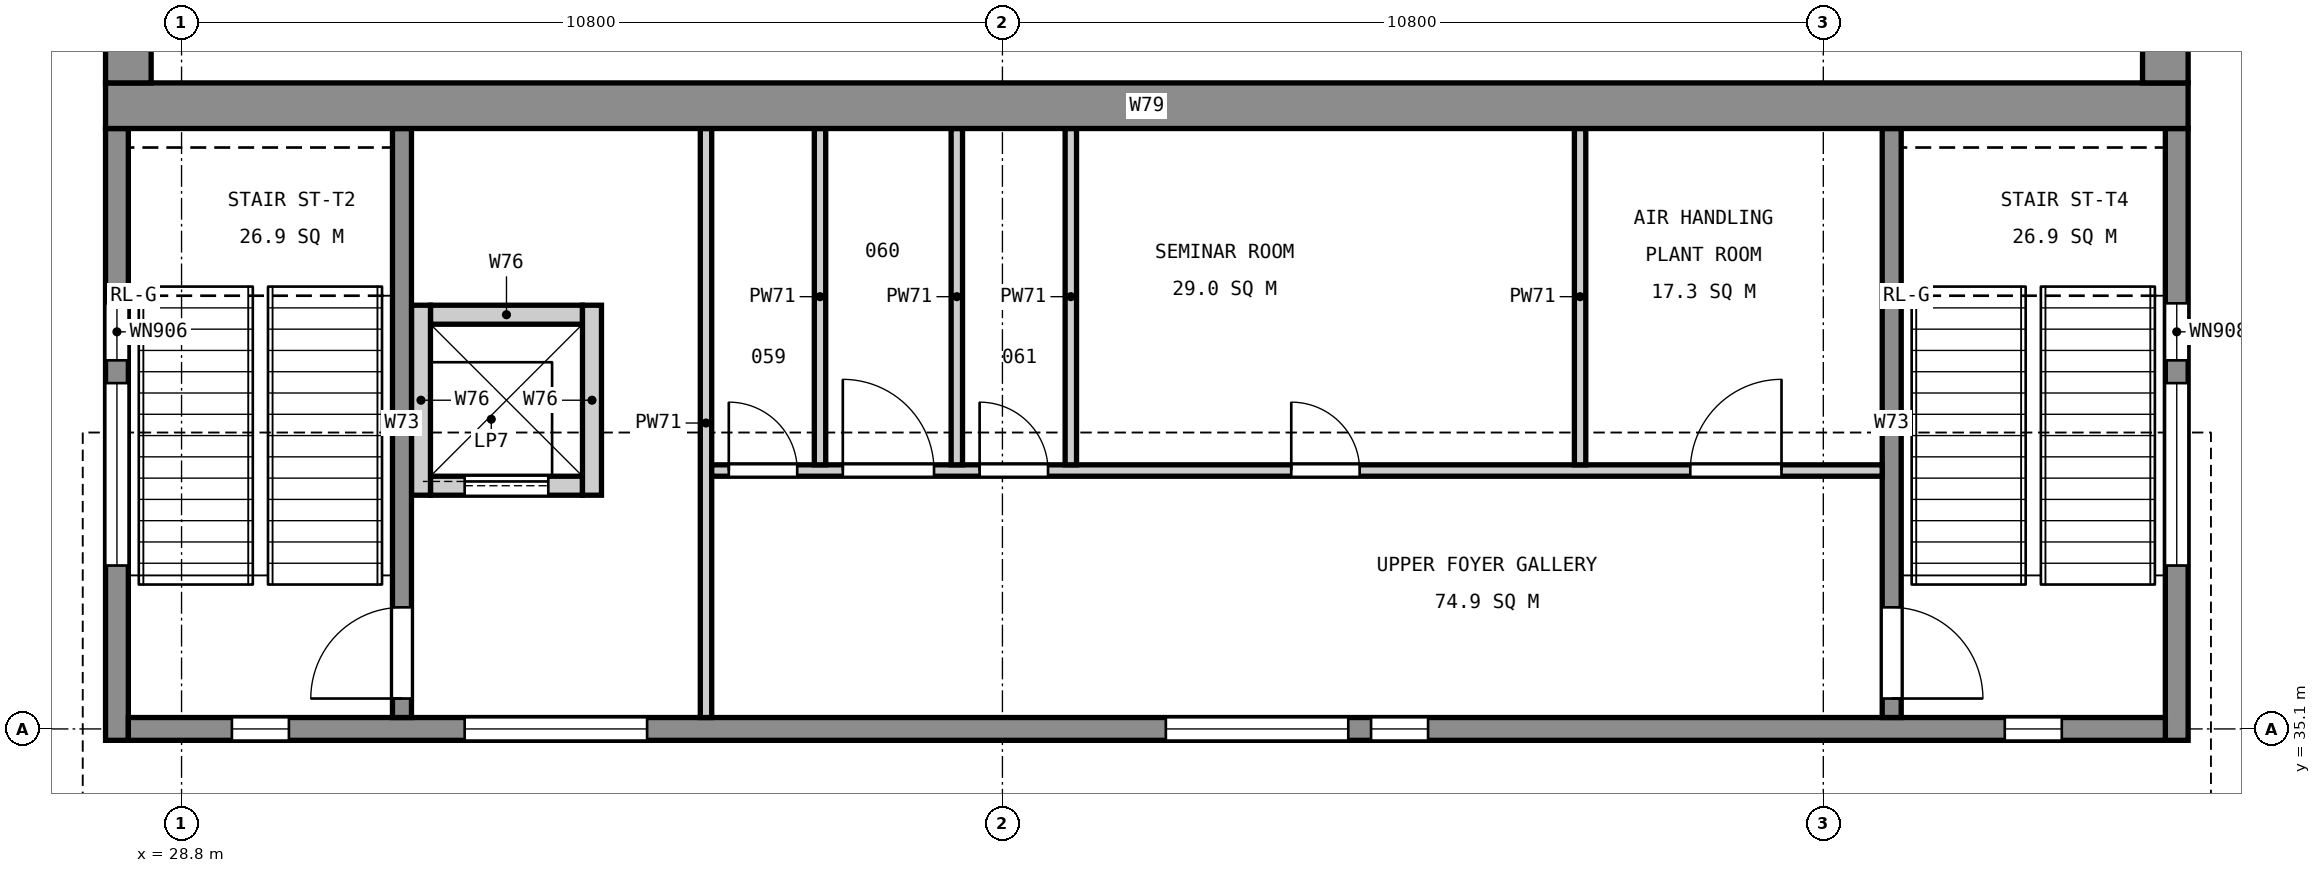
"""IFC4 building model, lengths in metres.
Left out: names, types, materials, properties, quantities, classifications, styles, units other than length and angle.
Written with IfcOpenShell. Run it as: python <this file> out.ifc"""

import sys

from ifc_helpers import new_model, si_unit, direction, frame, frame_2d, origin, place, context, subcontext, project, spatial, rectangle, extrude, element, fill, save


model = new_model("IFC4")
c1 = context("Model", 3, precision=1e-05, world=origin(), true_north=direction((0.0, 1.0)))
c2 = subcontext(c1, "Body", "Model", "MODEL_VIEW")
j1 = project(units=[si_unit("LENGTHUNIT", "METRE"), si_unit("PLANEANGLEUNIT", "RADIAN")], contexts=[c1])
p1 = place(None, origin())
s1 = spatial("IfcSite", under=j1, at=p1, CompositionType="ELEMENT")
p2 = place(p1, origin())
s2 = spatial("IfcBuilding", under=s1, at=p2, CompositionType="ELEMENT")
p3 = place(p2, frame((0.0, 0.0, 6.0)))
s3 = spatial("IfcBuildingStorey", under=s2, at=p3, CompositionType="ELEMENT", Elevation=6.0)
p4 = place(p3, frame((32.075, 38.3, 0.0), z_axis=(0.0, 0.0, 1.0), x_axis=(1.0, 0.0, 0.0)))
e1 = element("IfcWall", 1, at=p4, inside=s3, PredefinedType="SOLIDWALL", context=c2, shape_type="SweptSolid", body=[
    extrude(rectangle(XDim=2.0, YDim=0.25, at=frame_2d((1.0, 0.0))), origin(), (0.0, 0.0, 1.0), 5.1),
])
p5 = place(p4, frame((0.45, 0.0, 0.0)))
e2 = element("IfcOpeningElement", 2, at=p5, cuts=e1, PredefinedType="OPENING", context=c2, shape_type="SweptSolid", body=[
    extrude(rectangle(XDim=1.1, YDim=2.1, at=frame_2d((0.55, 1.05))), frame((0.0, 0.135, 0.0), z_axis=(0.0, -1.0, 0.0), x_axis=(1.0, 0.0, 0.0)), (0.0, 0.0, 1.0), 0.27),
])
p6 = place(p3, frame((32.075, 40.55, 0.0), z_axis=(0.0, 0.0, 1.0), x_axis=(1.0, 0.0, 0.0)))
e3 = element("IfcWall", 3, at=p6, inside=s3, PredefinedType="SOLIDWALL", context=c2, shape_type="SweptSolid", body=[
    extrude(rectangle(XDim=2.0, YDim=0.25, at=frame_2d((1.0, 0.0))), origin(), (0.0, 0.0, 1.0), 5.1),
])
for number, where, z_axis, x_axis in (
    (4, (31.95, 38.175, 0.0), (0.0, 0.0, 1.0), (0.0, 1.0, 0.0)),
    (5, (34.2, 38.175, 0.0), (0.0, 0.0, 1.0), (0.0, 1.0, 0.0)),
):
    element("IfcWall", number, at=place(p3, frame(where, z_axis=z_axis, x_axis=x_axis)), inside=s3, PredefinedType="SOLIDWALL", context=c2, shape_type="SweptSolid", body=[
        extrude(rectangle(XDim=2.5, YDim=0.25, at=frame_2d((1.25, 0.0))), origin(), (0.0, 0.0, 1.0), 5.1),
    ])
p7 = place(p3, frame((27.95, 34.95, 0.0), z_axis=(0.0, 0.0, 1.0), x_axis=(0.0, 1.0, 0.0)))
e6 = element("IfcWall", 6, at=p7, inside=s3, PredefinedType="SOLIDWALL", context=c2, shape_type="SweptSolid", body=[
    extrude(rectangle(XDim=8.05, YDim=0.3, at=frame_2d((4.025, 0.0))), origin(), (0.0, 0.0, 1.0), 5.1),
])
p8 = place(p7, frame((2.3, 0.0, 0.9)))
e7 = element("IfcOpeningElement", 7, at=p8, cuts=e6, PredefinedType="OPENING", context=c2, shape_type="SweptSolid", body=[
    extrude(rectangle(XDim=2.4, YDim=1.8, at=frame_2d((1.2, 0.9))), frame((0.0, 0.16, 0.0), z_axis=(0.0, -1.0, 0.0), x_axis=(1.0, 0.0, 0.0)), (0.0, 0.0, 1.0), 0.32),
])
p9 = place(p7, frame((5.0, 0.0, 0.8)))
e8 = element("IfcOpeningElement", 8, at=p9, cuts=e6, PredefinedType="OPENING", context=c2, shape_type="SweptSolid", body=[
    extrude(rectangle(XDim=0.75, YDim=1.2, at=frame_2d((0.375, 0.6))), frame((0.0, 0.16, 0.0), z_axis=(0.0, -1.0, 0.0), x_axis=(1.0, 0.0, 0.0)), (0.0, 0.0, 1.0), 0.32),
])
p10 = place(p3, frame((55.05, 34.95, 0.0), z_axis=(0.0, 0.0, 1.0), x_axis=(0.0, 1.0, 0.0)))
e9 = element("IfcWall", 9, at=p10, inside=s3, PredefinedType="SOLIDWALL", context=c2, shape_type="SweptSolid", body=[
    extrude(rectangle(XDim=8.05, YDim=0.3, at=frame_2d((4.025, 0.0))), origin(), (0.0, 0.0, 1.0), 5.1),
])
p11 = place(p10, frame((2.3, 0.0, 0.9)))
e10 = element("IfcOpeningElement", 10, at=p11, cuts=e9, PredefinedType="OPENING", context=c2, shape_type="SweptSolid", body=[
    extrude(rectangle(XDim=2.4, YDim=1.8, at=frame_2d((1.2, 0.9))), frame((0.0, 0.16, 0.0), z_axis=(0.0, -1.0, 0.0), x_axis=(1.0, 0.0, 0.0)), (0.0, 0.0, 1.0), 0.32),
])
p12 = place(p10, frame((5.0, 0.0, 0.8)))
e11 = element("IfcOpeningElement", 11, at=p12, cuts=e9, PredefinedType="OPENING", context=c2, shape_type="SweptSolid", body=[
    extrude(rectangle(XDim=0.75, YDim=1.2, at=frame_2d((0.375, 0.6))), frame((0.0, 0.16, 0.0), z_axis=(0.0, -1.0, 0.0), x_axis=(1.0, 0.0, 0.0)), (0.0, 0.0, 1.0), 0.32),
])
p13 = place(p3, frame((28.1, 35.1, 0.0), z_axis=(0.0, 0.0, 1.0), x_axis=(1.0, 0.0, 0.0)))
e12 = element("IfcWall", 12, at=p13, inside=s3, PredefinedType="SOLIDWALL", context=c2, shape_type="SweptSolid", body=[
    extrude(rectangle(XDim=26.8, YDim=0.3, at=frame_2d((13.4, 0.0))), origin(), (0.0, 0.0, 1.0), 5.1),
])
p14 = place(p13, frame((1.363, 0.0, 0.8)))
e13 = element("IfcOpeningElement", 13, at=p14, cuts=e12, PredefinedType="OPENING", context=c2, shape_type="SweptSolid", body=[
    extrude(rectangle(XDim=0.75, YDim=1.2, at=frame_2d((0.375, 0.6))), frame((0.0, 0.16, 0.0), z_axis=(0.0, -1.0, 0.0), x_axis=(1.0, 0.0, 0.0)), (0.0, 0.0, 1.0), 0.32),
])
p15 = place(p13, frame((4.425, 0.0, 0.9)))
e14 = element("IfcOpeningElement", 14, at=p15, cuts=e12, PredefinedType="OPENING", context=c2, shape_type="SweptSolid", body=[
    extrude(rectangle(XDim=2.4, YDim=1.8, at=frame_2d((1.2, 0.9))), frame((0.0, 0.16, 0.0), z_axis=(0.0, -1.0, 0.0), x_axis=(1.0, 0.0, 0.0)), (0.0, 0.0, 1.0), 0.32),
])
p16 = place(p13, frame((13.65, 0.0, 0.9)))
e15 = element("IfcOpeningElement", 15, at=p16, cuts=e12, PredefinedType="OPENING", context=c2, shape_type="SweptSolid", body=[
    extrude(rectangle(XDim=2.4, YDim=1.8, at=frame_2d((1.2, 0.9))), frame((0.0, 0.16, 0.0), z_axis=(0.0, -1.0, 0.0), x_axis=(1.0, 0.0, 0.0)), (0.0, 0.0, 1.0), 0.32),
])
p17 = place(p13, frame((16.35, 0.0, 0.8)))
e16 = element("IfcOpeningElement", 16, at=p17, cuts=e12, PredefinedType="OPENING", context=c2, shape_type="SweptSolid", body=[
    extrude(rectangle(XDim=0.75, YDim=1.2, at=frame_2d((0.375, 0.6))), frame((0.0, 0.16, 0.0), z_axis=(0.0, -1.0, 0.0), x_axis=(1.0, 0.0, 0.0)), (0.0, 0.0, 1.0), 0.32),
])
p18 = place(p13, frame((24.688, 0.0, 0.8)))
e17 = element("IfcOpeningElement", 17, at=p18, cuts=e12, PredefinedType="OPENING", context=c2, shape_type="SweptSolid", body=[
    extrude(rectangle(XDim=0.75, YDim=1.2, at=frame_2d((0.375, 0.6))), frame((0.0, 0.16, 0.0), z_axis=(0.0, -1.0, 0.0), x_axis=(1.0, 0.0, 0.0)), (0.0, 0.0, 1.0), 0.32),
])
p19 = place(p3, frame((31.7, 35.25, 0.0), z_axis=(0.0, 0.0, 1.0), x_axis=(0.0, 1.0, 0.0)))
e18 = element("IfcWall", 18, at=p19, inside=s3, PredefinedType="SOLIDWALL", context=c2, shape_type="SweptSolid", body=[
    extrude(rectangle(XDim=7.75, YDim=0.25, at=frame_2d((3.875, 0.0))), origin(), (0.0, 0.0, 1.0), 5.1),
])
p20 = place(p19, frame((0.25, 0.0, 0.0)))
e19 = element("IfcOpeningElement", 19, at=p20, cuts=e18, PredefinedType="OPENING", context=c2, shape_type="SweptSolid", body=[
    extrude(rectangle(XDim=1.2, YDim=2.1, at=frame_2d((0.6, 1.05))), frame((0.0, 0.135, 0.0), z_axis=(0.0, -1.0, 0.0), x_axis=(1.0, 0.0, 0.0)), (0.0, 0.0, 1.0), 0.27),
])
p21 = place(p3, frame((51.3, 35.25, 0.0), z_axis=(0.0, 0.0, 1.0), x_axis=(0.0, 1.0, 0.0)))
e20 = element("IfcWall", 20, at=p21, inside=s3, PredefinedType="SOLIDWALL", context=c2, shape_type="SweptSolid", body=[
    extrude(rectangle(XDim=7.75, YDim=0.25, at=frame_2d((3.875, 0.0))), origin(), (0.0, 0.0, 1.0), 5.1),
])
p22 = place(p21, frame((0.25, 0.0, 0.0)))
e21 = element("IfcOpeningElement", 21, at=p22, cuts=e20, PredefinedType="OPENING", context=c2, shape_type="SweptSolid", body=[
    extrude(rectangle(XDim=1.2, YDim=2.1, at=frame_2d((0.6, 1.05))), frame((0.0, 0.135, 0.0), z_axis=(0.0, -1.0, 0.0), x_axis=(1.0, 0.0, 0.0)), (0.0, 0.0, 1.0), 0.27),
])
p23 = place(p3, frame((35.7, 35.25, 0.0), z_axis=(0.0, 0.0, 1.0), x_axis=(0.0, 1.0, 0.0)))
e22 = element("IfcWall", 22, at=p23, inside=s3, PredefinedType="SOLIDWALL", context=c2, shape_type="SweptSolid", body=[
    extrude(rectangle(XDim=7.75, YDim=0.15, at=frame_2d((3.875, 0.0))), origin(), (0.0, 0.0, 1.0), 5.1),
])
p24 = place(p3, frame((35.775, 38.5, 0.0), z_axis=(0.0, 0.0, 1.0), x_axis=(1.0, 0.0, 0.0)))
e23 = element("IfcWall", 23, at=p24, inside=s3, PredefinedType="SOLIDWALL", context=c2, shape_type="SweptSolid", body=[
    extrude(rectangle(XDim=15.4, YDim=0.15, at=frame_2d((7.7, 0.0))), origin(), (0.0, 0.0, 1.0), 5.1),
])
p25 = place(p24, frame((0.225, 0.0, 0.0)))
e24 = element("IfcOpeningElement", 24, at=p25, cuts=e23, PredefinedType="OPENING", context=c2, shape_type="SweptSolid", body=[
    extrude(rectangle(XDim=0.9, YDim=2.1, at=frame_2d((0.45, 1.05))), frame((0.0, 0.085, 0.0), z_axis=(0.0, -1.0, 0.0), x_axis=(1.0, 0.0, 0.0)), (0.0, 0.0, 1.0), 0.17),
])
p26 = place(p24, frame((1.725, 0.0, 0.0)))
e25 = element("IfcOpeningElement", 25, at=p26, cuts=e23, PredefinedType="OPENING", context=c2, shape_type="SweptSolid", body=[
    extrude(rectangle(XDim=1.2, YDim=2.1, at=frame_2d((0.6, 1.05))), frame((0.0, 0.085, 0.0), z_axis=(0.0, -1.0, 0.0), x_axis=(1.0, 0.0, 0.0)), (0.0, 0.0, 1.0), 0.17),
])
p27 = place(p24, frame((3.525, 0.0, 0.0)))
e26 = element("IfcOpeningElement", 26, at=p27, cuts=e23, PredefinedType="OPENING", context=c2, shape_type="SweptSolid", body=[
    extrude(rectangle(XDim=0.9, YDim=2.1, at=frame_2d((0.45, 1.05))), frame((0.0, 0.085, 0.0), z_axis=(0.0, -1.0, 0.0), x_axis=(1.0, 0.0, 0.0)), (0.0, 0.0, 1.0), 0.17),
])
p28 = place(p24, frame((7.625, 0.0, 0.0)))
e27 = element("IfcOpeningElement", 27, at=p28, cuts=e23, PredefinedType="OPENING", context=c2, shape_type="SweptSolid", body=[
    extrude(rectangle(XDim=0.9, YDim=2.1, at=frame_2d((0.45, 1.05))), frame((0.0, 0.085, 0.0), z_axis=(0.0, -1.0, 0.0), x_axis=(1.0, 0.0, 0.0)), (0.0, 0.0, 1.0), 0.17),
])
p29 = place(p24, frame((12.875, 0.0, 0.0)))
e28 = element("IfcOpeningElement", 28, at=p29, cuts=e23, PredefinedType="OPENING", context=c2, shape_type="SweptSolid", body=[
    extrude(rectangle(XDim=1.2, YDim=2.1, at=frame_2d((0.6, 1.05))), frame((0.0, 0.085, 0.0), z_axis=(0.0, -1.0, 0.0), x_axis=(1.0, 0.0, 0.0)), (0.0, 0.0, 1.0), 0.17),
])
for number, where, z_axis, x_axis in (
    (29, (37.2, 38.575, 0.0), (0.0, 0.0, 1.0), (0.0, 1.0, 0.0)),
    (30, (39.0, 38.575, 0.0), (0.0, 0.0, 1.0), (0.0, 1.0, 0.0)),
    (31, (40.5, 38.575, 0.0), (0.0, 0.0, 1.0), (0.0, 1.0, 0.0)),
    (32, (47.2, 38.575, 0.0), (0.0, 0.0, 1.0), (0.0, 1.0, 0.0)),
):
    element("IfcWall", number, at=place(p3, frame(where, z_axis=z_axis, x_axis=x_axis)), inside=s3, PredefinedType="SOLIDWALL", context=c2, shape_type="SweptSolid", body=[
        extrude(rectangle(XDim=4.425, YDim=0.15, at=frame_2d((2.212, 0.0))), origin(), (0.0, 0.0, 1.0), 5.1),
    ])
p30 = place(p3, frame((27.8, 43.3, 0.0), z_axis=(0.0, 0.0, 1.0), x_axis=(1.0, 0.0, 0.0)))
e33 = element("IfcWall", 33, at=p30, inside=s3, PredefinedType="SOLIDWALL", context=c2, shape_type="SweptSolid", body=[
    extrude(rectangle(XDim=27.4, YDim=0.6, at=frame_2d((13.7, 0.0))), origin(), (0.0, 0.0, 1.0), 4.2),
])
for number, where, z_axis, x_axis in (
    (34, (28.1, 43.6, 0.0), (0.0, 0.0, 1.0), (0.0, 1.0, 0.0)),
    (35, (54.9, 43.6, 0.0), (0.0, 0.0, 1.0), (0.0, 1.0, 0.0)),
):
    element("IfcWall", number, at=place(p3, frame(where, z_axis=z_axis, x_axis=x_axis)), inside=s3, PredefinedType="SOLIDWALL", context=c2, shape_type="SweptSolid", body=[
        extrude(rectangle(XDim=21.8, YDim=0.6, at=frame_2d((10.9, 0.0))), origin(), (0.0, 0.0, 1.0), 5.4),
    ])
p31 = place(p20, origin())
e36 = element("IfcDoor", 36, at=p31, inside=s3, OperationType="SINGLE_SWING_LEFT", PredefinedType="DOOR", context=c2, shape_type="SweptSolid", body=[
    extrude(rectangle(XDim=1.2, YDim=2.1, at=frame_2d((0.6, 1.05))), frame((0.0, 0.025, 0.0), z_axis=(0.0, -1.0, 0.0), x_axis=(1.0, 0.0, 0.0)), (0.0, 0.0, 1.0), 0.05),
])
fill(e19, e36)
p32 = place(p22, frame((1.2, 0.0, 0.0), z_axis=(0.0, 0.0, 1.0), x_axis=(-1.0, 0.0, 0.0)))
e37 = element("IfcDoor", 37, at=p32, inside=s3, OperationType="SINGLE_SWING_RIGHT", PredefinedType="DOOR", context=c2, shape_type="SweptSolid", body=[
    extrude(rectangle(XDim=1.2, YDim=2.1, at=frame_2d((0.6, 1.05))), frame((0.0, 0.025, 0.0), z_axis=(0.0, -1.0, 0.0), x_axis=(1.0, 0.0, 0.0)), (0.0, 0.0, 1.0), 0.05),
])
fill(e21, e37)
p33 = place(p5, origin())
e38 = element("IfcDoor", 38, at=p33, inside=s3, OperationType="SLIDING_TO_LEFT", PredefinedType="DOOR", context=c2, shape_type="SweptSolid", body=[
    extrude(rectangle(XDim=1.1, YDim=2.1, at=frame_2d((0.55, 1.05))), frame((0.0, 0.025, 0.0), z_axis=(0.0, -1.0, 0.0), x_axis=(1.0, 0.0, 0.0)), (0.0, 0.0, 1.0), 0.05),
])
fill(e2, e38)
p34 = place(p25, origin())
e39 = element("IfcDoor", 39, at=p34, inside=s3, OperationType="SINGLE_SWING_LEFT", PredefinedType="DOOR", context=c2, shape_type="SweptSolid", body=[
    extrude(rectangle(XDim=0.9, YDim=2.1, at=frame_2d((0.45, 1.05))), frame((0.0, 0.025, 0.0), z_axis=(0.0, -1.0, 0.0), x_axis=(1.0, 0.0, 0.0)), (0.0, 0.0, 1.0), 0.05),
])
fill(e24, e39)
p35 = place(p26, origin())
e40 = element("IfcDoor", 40, at=p35, inside=s3, OperationType="SINGLE_SWING_LEFT", PredefinedType="DOOR", context=c2, shape_type="SweptSolid", body=[
    extrude(rectangle(XDim=1.2, YDim=2.1, at=frame_2d((0.6, 1.05))), frame((0.0, 0.025, 0.0), z_axis=(0.0, -1.0, 0.0), x_axis=(1.0, 0.0, 0.0)), (0.0, 0.0, 1.0), 0.05),
])
fill(e25, e40)
p36 = place(p27, origin())
e41 = element("IfcDoor", 41, at=p36, inside=s3, OperationType="SINGLE_SWING_LEFT", PredefinedType="DOOR", context=c2, shape_type="SweptSolid", body=[
    extrude(rectangle(XDim=0.9, YDim=2.1, at=frame_2d((0.45, 1.05))), frame((0.0, 0.025, 0.0), z_axis=(0.0, -1.0, 0.0), x_axis=(1.0, 0.0, 0.0)), (0.0, 0.0, 1.0), 0.05),
])
fill(e26, e41)
p37 = place(p28, origin())
e42 = element("IfcDoor", 42, at=p37, inside=s3, OperationType="SINGLE_SWING_LEFT", PredefinedType="DOOR", context=c2, shape_type="SweptSolid", body=[
    extrude(rectangle(XDim=0.9, YDim=2.1, at=frame_2d((0.45, 1.05))), frame((0.0, 0.025, 0.0), z_axis=(0.0, -1.0, 0.0), x_axis=(1.0, 0.0, 0.0)), (0.0, 0.0, 1.0), 0.05),
])
fill(e27, e42)
p38 = place(p29, origin())
e43 = element("IfcDoor", 43, at=p38, inside=s3, OperationType="SINGLE_SWING_RIGHT", PredefinedType="DOOR", context=c2, shape_type="SweptSolid", body=[
    extrude(rectangle(XDim=1.2, YDim=2.1, at=frame_2d((0.6, 1.05))), frame((0.0, 0.025, 0.0), z_axis=(0.0, -1.0, 0.0), x_axis=(1.0, 0.0, 0.0)), (0.0, 0.0, 1.0), 0.05),
])
fill(e28, e43)
p39 = place(p8, origin())
e44 = element("IfcWindow", 44, at=p39, inside=s3, PartitioningType="SINGLE_PANEL", PredefinedType="WINDOW", context=c2, shape_type="SweptSolid", body=[
    extrude(rectangle(XDim=2.4, YDim=1.8, at=frame_2d((1.2, 0.9))), frame((0.0, 0.03, 0.0), z_axis=(0.0, -1.0, 0.0), x_axis=(1.0, 0.0, 0.0)), (0.0, 0.0, 1.0), 0.06),
])
fill(e7, e44)
p40 = place(p9, origin())
e45 = element("IfcWindow", 45, at=p40, inside=s3, PartitioningType="SINGLE_PANEL", PredefinedType="WINDOW", context=c2, shape_type="SweptSolid", body=[
    extrude(rectangle(XDim=0.75, YDim=1.2, at=frame_2d((0.375, 0.6))), frame((0.0, 0.03, 0.0), z_axis=(0.0, -1.0, 0.0), x_axis=(1.0, 0.0, 0.0)), (0.0, 0.0, 1.0), 0.06),
])
fill(e8, e45)
p41 = place(p11, origin())
e46 = element("IfcWindow", 46, at=p41, inside=s3, PartitioningType="SINGLE_PANEL", PredefinedType="WINDOW", context=c2, shape_type="SweptSolid", body=[
    extrude(rectangle(XDim=2.4, YDim=1.8, at=frame_2d((1.2, 0.9))), frame((0.0, 0.03, 0.0), z_axis=(0.0, -1.0, 0.0), x_axis=(1.0, 0.0, 0.0)), (0.0, 0.0, 1.0), 0.06),
])
fill(e10, e46)
p42 = place(p12, origin())
e47 = element("IfcWindow", 47, at=p42, inside=s3, PartitioningType="SINGLE_PANEL", PredefinedType="WINDOW", context=c2, shape_type="SweptSolid", body=[
    extrude(rectangle(XDim=0.75, YDim=1.2, at=frame_2d((0.375, 0.6))), frame((0.0, 0.03, 0.0), z_axis=(0.0, -1.0, 0.0), x_axis=(1.0, 0.0, 0.0)), (0.0, 0.0, 1.0), 0.06),
])
fill(e11, e47)
p43 = place(p14, origin())
e48 = element("IfcWindow", 48, at=p43, inside=s3, PartitioningType="SINGLE_PANEL", PredefinedType="WINDOW", context=c2, shape_type="SweptSolid", body=[
    extrude(rectangle(XDim=0.75, YDim=1.2, at=frame_2d((0.375, 0.6))), frame((0.0, 0.03, 0.0), z_axis=(0.0, -1.0, 0.0), x_axis=(1.0, 0.0, 0.0)), (0.0, 0.0, 1.0), 0.06),
])
fill(e13, e48)
p44 = place(p15, origin())
e49 = element("IfcWindow", 49, at=p44, inside=s3, PartitioningType="SINGLE_PANEL", PredefinedType="WINDOW", context=c2, shape_type="SweptSolid", body=[
    extrude(rectangle(XDim=2.4, YDim=1.8, at=frame_2d((1.2, 0.9))), frame((0.0, 0.03, 0.0), z_axis=(0.0, -1.0, 0.0), x_axis=(1.0, 0.0, 0.0)), (0.0, 0.0, 1.0), 0.06),
])
fill(e14, e49)
p45 = place(p16, origin())
e50 = element("IfcWindow", 50, at=p45, inside=s3, PartitioningType="SINGLE_PANEL", PredefinedType="WINDOW", context=c2, shape_type="SweptSolid", body=[
    extrude(rectangle(XDim=2.4, YDim=1.8, at=frame_2d((1.2, 0.9))), frame((0.0, 0.03, 0.0), z_axis=(0.0, -1.0, 0.0), x_axis=(1.0, 0.0, 0.0)), (0.0, 0.0, 1.0), 0.06),
])
fill(e15, e50)
p46 = place(p17, origin())
e51 = element("IfcWindow", 51, at=p46, inside=s3, PartitioningType="SINGLE_PANEL", PredefinedType="WINDOW", context=c2, shape_type="SweptSolid", body=[
    extrude(rectangle(XDim=0.75, YDim=1.2, at=frame_2d((0.375, 0.6))), frame((0.0, 0.03, 0.0), z_axis=(0.0, -1.0, 0.0), x_axis=(1.0, 0.0, 0.0)), (0.0, 0.0, 1.0), 0.06),
])
fill(e16, e51)
p47 = place(p18, origin())
e52 = element("IfcWindow", 52, at=p47, inside=s3, PartitioningType="SINGLE_PANEL", PredefinedType="WINDOW", context=c2, shape_type="SweptSolid", body=[
    extrude(rectangle(XDim=0.75, YDim=1.2, at=frame_2d((0.375, 0.6))), frame((0.0, 0.03, 0.0), z_axis=(0.0, -1.0, 0.0), x_axis=(1.0, 0.0, 0.0)), (0.0, 0.0, 1.0), 0.06),
])
fill(e17, e52)
save(model, sys.argv[1])
